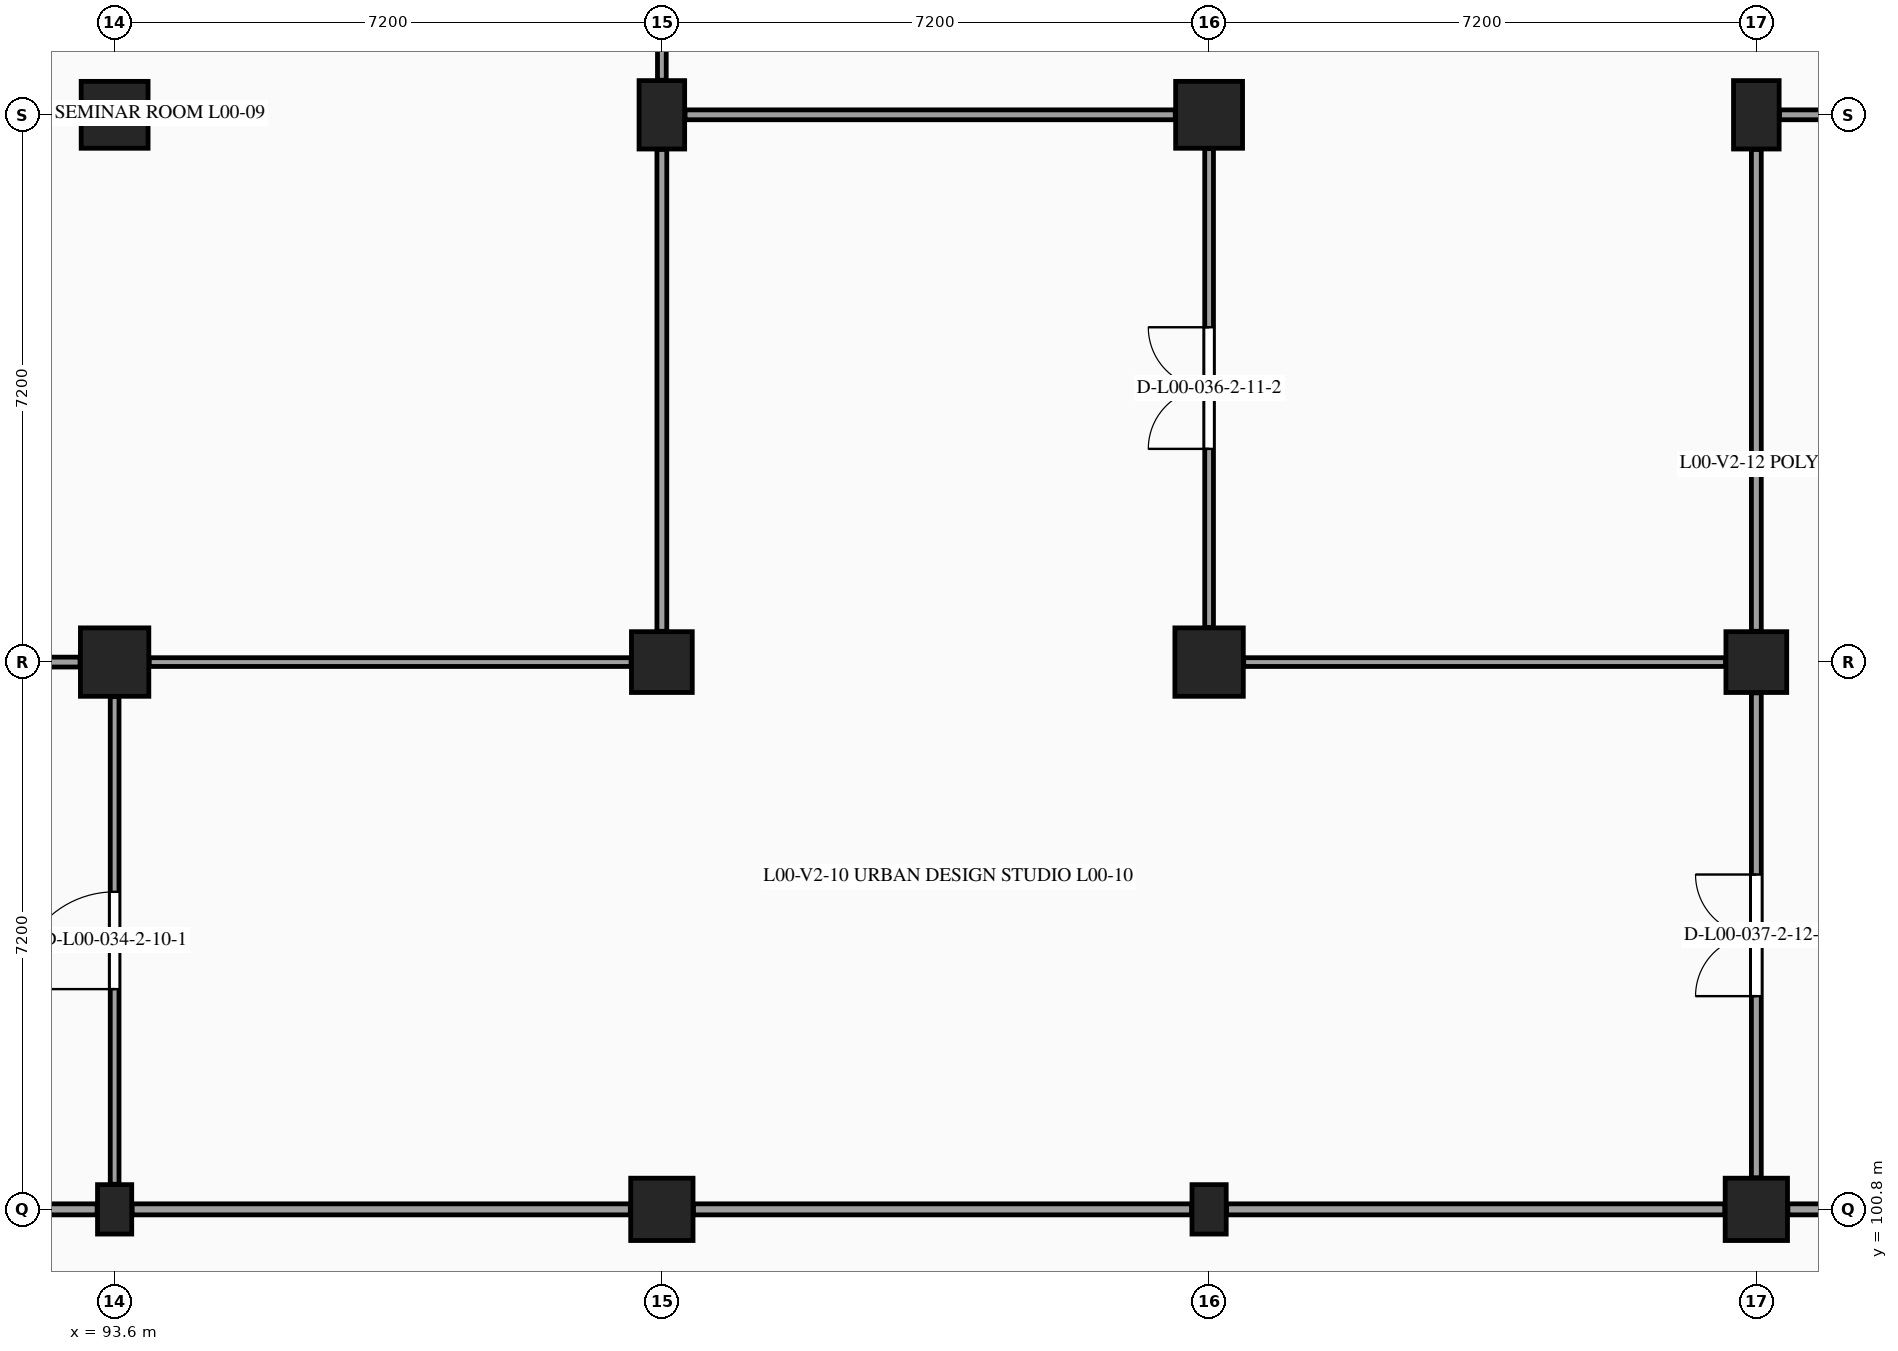
"""IFC4 building model, lengths in metres.
Left out: names, types, materials, properties, quantities, classifications, styles, units other than length and angle.
Written with IfcOpenShell. Run it as: python <this file> out.ifc"""

import sys

from ifc_helpers import new_model, si_unit, direction, frame, frame_2d, origin, origin_2d, place, context, subcontext, project, spatial, rectangle, extrude, element, fill, save


model = new_model("IFC4")
c1 = context("Model", 3, precision=1e-05, world=origin(), true_north=direction((0.0, 1.0)))
c2 = subcontext(c1, "Body", "Model", "MODEL_VIEW")
j1 = project(units=[si_unit("LENGTHUNIT", "METRE"), si_unit("PLANEANGLEUNIT", "RADIAN")], contexts=[c1])
p1 = place(None, origin())
s1 = spatial("IfcSite", under=j1, at=p1, CompositionType="ELEMENT")
p2 = place(p1, origin())
s2 = spatial("IfcBuilding", under=s1, at=p2, CompositionType="ELEMENT")
p3 = place(p2, origin())
s3 = spatial("IfcBuildingStorey", under=s2, at=p3, CompositionType="ELEMENT", Elevation=0.0)
p4 = place(p3, frame((93.6, 100.8, 0.0), z_axis=(0.0, 0.0, 1.0), x_axis=(1.0, 0.0, 0.0)))
e1 = element("IfcColumn", 1, at=p4, inside=s3, PredefinedType="PILASTER", context=c2, shape_type="SweptSolid", body=[
    extrude(rectangle(XDim=0.45, YDim=0.65, at=origin_2d()), origin(), (0.0, 0.0, 1.0), 5.4),
])
p5 = place(p3, frame((93.6, 108.0, 0.0), z_axis=(0.0, 0.0, 1.0), x_axis=(1.0, 0.0, 0.0)))
e2 = element("IfcColumn", 2, at=p5, inside=s3, PredefinedType="COLUMN", context=c2, shape_type="SweptSolid", body=[
    extrude(rectangle(XDim=0.9, YDim=0.9, at=origin_2d()), origin(), (0.0, 0.0, 1.0), 5.4),
])
p6 = place(p3, frame((93.6, 115.2, 0.0), z_axis=(0.0, 0.0, 1.0), x_axis=(1.0, 0.0, 0.0)))
e3 = element("IfcColumn", 3, at=p6, inside=s3, PredefinedType="COLUMN", context=c2, shape_type="SweptSolid", body=[
    extrude(rectangle(XDim=0.88, YDim=0.88, at=origin_2d()), origin(), (0.0, 0.0, 1.0), 5.4),
])
p7 = place(p3, frame((100.8, 100.8, 0.0), z_axis=(0.0, 0.0, 1.0), x_axis=(1.0, 0.0, 0.0)))
e4 = element("IfcColumn", 4, at=p7, inside=s3, PredefinedType="COLUMN", context=c2, shape_type="SweptSolid", body=[
    extrude(rectangle(XDim=0.82, YDim=0.82, at=origin_2d()), origin(), (0.0, 0.0, 1.0), 5.4),
])
p8 = place(p3, frame((100.8, 108.0, 0.0), z_axis=(0.0, 0.0, 1.0), x_axis=(1.0, 0.0, 0.0)))
e5 = element("IfcColumn", 5, at=p8, inside=s3, PredefinedType="COLUMN", context=c2, shape_type="SweptSolid", body=[
    extrude(rectangle(XDim=0.8, YDim=0.8, at=origin_2d()), origin(), (0.0, 0.0, 1.0), 5.4),
])
p9 = place(p3, frame((100.8, 115.2, 0.0), z_axis=(0.0, 0.0, 1.0), x_axis=(1.0, 0.0, 0.0)))
e6 = element("IfcColumn", 6, at=p9, inside=s3, PredefinedType="COLUMN", context=c2, shape_type="SweptSolid", body=[
    extrude(rectangle(XDim=0.6, YDim=0.9, at=origin_2d()), origin(), (0.0, 0.0, 1.0), 5.4),
])
p10 = place(p3, frame((108.0, 100.8, 0.0), z_axis=(0.0, 0.0, 1.0), x_axis=(1.0, 0.0, 0.0)))
e7 = element("IfcColumn", 7, at=p10, inside=s3, PredefinedType="PILASTER", context=c2, shape_type="SweptSolid", body=[
    extrude(rectangle(XDim=0.45, YDim=0.65, at=origin_2d()), origin(), (0.0, 0.0, 1.0), 5.4),
])
p11 = place(p3, frame((108.0, 108.0, 0.0), z_axis=(0.0, 0.0, 1.0), x_axis=(1.0, 0.0, 0.0)))
e8 = element("IfcColumn", 8, at=p11, inside=s3, PredefinedType="COLUMN", context=c2, shape_type="SweptSolid", body=[
    extrude(rectangle(XDim=0.9, YDim=0.9, at=origin_2d()), origin(), (0.0, 0.0, 1.0), 5.4),
])
p12 = place(p3, frame((108.0, 115.2, 0.0), z_axis=(0.0, 0.0, 1.0), x_axis=(1.0, 0.0, 0.0)))
e9 = element("IfcColumn", 9, at=p12, inside=s3, PredefinedType="COLUMN", context=c2, shape_type="SweptSolid", body=[
    extrude(rectangle(XDim=0.88, YDim=0.88, at=origin_2d()), origin(), (0.0, 0.0, 1.0), 5.4),
])
p13 = place(p3, frame((115.2, 100.8, 0.0), z_axis=(0.0, 0.0, 1.0), x_axis=(1.0, 0.0, 0.0)))
e10 = element("IfcColumn", 10, at=p13, inside=s3, PredefinedType="COLUMN", context=c2, shape_type="SweptSolid", body=[
    extrude(rectangle(XDim=0.82, YDim=0.82, at=origin_2d()), origin(), (0.0, 0.0, 1.0), 5.4),
])
p14 = place(p3, frame((115.2, 108.0, 0.0), z_axis=(0.0, 0.0, 1.0), x_axis=(1.0, 0.0, 0.0)))
e11 = element("IfcColumn", 11, at=p14, inside=s3, PredefinedType="COLUMN", context=c2, shape_type="SweptSolid", body=[
    extrude(rectangle(XDim=0.8, YDim=0.8, at=origin_2d()), origin(), (0.0, 0.0, 1.0), 5.4),
])
p15 = place(p3, frame((115.2, 115.2, 0.0), z_axis=(0.0, 0.0, 1.0), x_axis=(1.0, 0.0, 0.0)))
e12 = element("IfcColumn", 12, at=p15, inside=s3, PredefinedType="COLUMN", context=c2, shape_type="SweptSolid", body=[
    extrude(rectangle(XDim=0.6, YDim=0.9, at=origin_2d()), origin(), (0.0, 0.0, 1.0), 5.4),
])
p16 = place(p3, frame((86.815, 100.8, 0.0), z_axis=(0.0, 0.0, 1.0), x_axis=(1.0, 0.0, 0.0)))
e13 = element("IfcWall", 13, at=p16, inside=s3, PredefinedType="PARTITIONING", context=c2, shape_type="SweptSolid", body=[
    extrude(rectangle(XDim=6.555, YDim=0.145, at=frame_2d((3.278, 0.0))), origin(), (0.0, 0.0, 1.0), 4.35),
])
p17 = place(p3, frame((93.6, 101.13, 0.0), z_axis=(0.0, 0.0, 1.0), x_axis=(0.0, 1.0, 0.0)))
e14 = element("IfcWall", 14, at=p17, inside=s3, PredefinedType="PARTITIONING", context=c2, shape_type="SweptSolid", body=[
    extrude(rectangle(XDim=6.415, YDim=0.115, at=frame_2d((3.208, 0.0))), origin(), (0.0, 0.0, 1.0), 4.455),
])
p18 = place(p17, frame((2.567, 0.0, 0.0)))
e15 = element("IfcOpeningElement", 15, at=p18, cuts=e14, PredefinedType="OPENING", context=c2, shape_type="SweptSolid", body=[
    extrude(rectangle(XDim=1.28, YDim=2.24, at=frame_2d((0.64, 1.12))), frame((0.0, 0.067, 0.0), z_axis=(0.0, -1.0, 0.0), x_axis=(1.0, 0.0, 0.0)), (0.0, 0.0, 1.0), 0.135),
])
p19 = place(p3, frame((86.805, 108.0, 0.0), z_axis=(0.0, 0.0, 1.0), x_axis=(1.0, 0.0, 0.0)))
e16 = element("IfcWall", 16, at=p19, inside=s3, PredefinedType="PARTITIONING", context=c2, shape_type="SweptSolid", body=[
    extrude(rectangle(XDim=6.34, YDim=0.13, at=frame_2d((3.17, 0.0))), origin(), (0.0, 0.0, 1.0), 4.35),
])
p20 = place(p3, frame((93.83, 100.8, 0.0), z_axis=(0.0, 0.0, 1.0), x_axis=(1.0, 0.0, 0.0)))
e17 = element("IfcWall", 17, at=p20, inside=s3, PredefinedType="PARTITIONING", context=c2, shape_type="SweptSolid", body=[
    extrude(rectangle(XDim=6.555, YDim=0.145, at=frame_2d((3.277, 0.0))), origin(), (0.0, 0.0, 1.0), 4.365),
])
p21 = place(p3, frame((94.055, 108.0, 0.0), z_axis=(0.0, 0.0, 1.0), x_axis=(1.0, 0.0, 0.0)))
e18 = element("IfcWall", 18, at=p21, inside=s3, PredefinedType="PARTITIONING", context=c2, shape_type="SweptSolid", body=[
    extrude(rectangle(XDim=6.34, YDim=0.115, at=frame_2d((3.17, 0.0))), origin(), (0.0, 0.0, 1.0), 4.365),
])
p22 = place(p3, frame((100.8, 108.405, 0.0), z_axis=(0.0, 0.0, 1.0), x_axis=(0.0, 1.0, 0.0)))
e19 = element("IfcWall", 19, at=p22, inside=s3, PredefinedType="PARTITIONING", context=c2, shape_type="SweptSolid", body=[
    extrude(rectangle(XDim=6.34, YDim=0.13, at=frame_2d((3.17, 0.0))), origin(), (0.0, 0.0, 1.0), 4.405),
])
p23 = place(p3, frame((100.8, 115.655, 0.0), z_axis=(0.0, 0.0, 1.0), x_axis=(0.0, 1.0, 0.0)))
e20 = element("IfcWall", 20, at=p23, inside=s3, PredefinedType="PARTITIONING", context=c2, shape_type="SweptSolid", body=[
    extrude(rectangle(XDim=6.415, YDim=0.115, at=frame_2d((3.208, 0.0))), origin(), (0.0, 0.0, 1.0), 4.405),
])
p24 = place(p23, frame((2.407, 0.0, 0.0)))
e21 = element("IfcOpeningElement", 21, at=p24, cuts=e20, PredefinedType="OPENING", context=c2, shape_type="SweptSolid", body=[
    extrude(rectangle(XDim=1.6, YDim=2.2, at=frame_2d((0.8, 1.1))), frame((0.0, 0.067, 0.0), z_axis=(0.0, -1.0, 0.0), x_axis=(1.0, 0.0, 0.0)), (0.0, 0.0, 1.0), 0.135),
])
p25 = place(p3, frame((101.215, 100.8, 0.0), z_axis=(0.0, 0.0, 1.0), x_axis=(1.0, 0.0, 0.0)))
e22 = element("IfcWall", 22, at=p25, inside=s3, PredefinedType="PARTITIONING", context=c2, shape_type="SweptSolid", body=[
    extrude(rectangle(XDim=6.555, YDim=0.145, at=frame_2d((3.277, 0.0))), origin(), (0.0, 0.0, 1.0), 4.37),
])
p26 = place(p3, frame((108.0, 108.455, 0.0), z_axis=(0.0, 0.0, 1.0), x_axis=(0.0, 1.0, 0.0)))
e23 = element("IfcWall", 23, at=p26, inside=s3, PredefinedType="PARTITIONING", context=c2, shape_type="SweptSolid", body=[
    extrude(rectangle(XDim=6.3, YDim=0.115, at=frame_2d((3.15, 0.0))), origin(), (0.0, 0.0, 1.0), 4.405),
])
p27 = place(p26, frame((2.35, 0.0, 0.0)))
e24 = element("IfcOpeningElement", 24, at=p27, cuts=e23, PredefinedType="OPENING", context=c2, shape_type="SweptSolid", body=[
    extrude(rectangle(XDim=1.6, YDim=2.2, at=frame_2d((0.8, 1.1))), frame((0.0, 0.067, 0.0), z_axis=(0.0, -1.0, 0.0), x_axis=(1.0, 0.0, 0.0)), (0.0, 0.0, 1.0), 0.135),
])
p28 = place(p3, frame((101.105, 115.2, 0.0), z_axis=(0.0, 0.0, 1.0), x_axis=(1.0, 0.0, 0.0)))
e25 = element("IfcWall", 25, at=p28, inside=s3, PredefinedType="PARTITIONING", context=c2, shape_type="SweptSolid", body=[
    extrude(rectangle(XDim=6.45, YDim=0.13, at=frame_2d((3.225, 0.0))), origin(), (0.0, 0.0, 1.0), 4.37),
])
p29 = place(p3, frame((108.23, 100.8, 0.0), z_axis=(0.0, 0.0, 1.0), x_axis=(1.0, 0.0, 0.0)))
e26 = element("IfcWall", 26, at=p29, inside=s3, PredefinedType="PARTITIONING", context=c2, shape_type="SweptSolid", body=[
    extrude(rectangle(XDim=6.555, YDim=0.145, at=frame_2d((3.277, 0.0))), origin(), (0.0, 0.0, 1.0), 4.39),
])
p30 = place(p3, frame((115.2, 101.215, 0.0), z_axis=(0.0, 0.0, 1.0), x_axis=(0.0, 1.0, 0.0)))
e27 = element("IfcWall", 27, at=p30, inside=s3, PredefinedType="PARTITIONING", context=c2, shape_type="SweptSolid", body=[
    extrude(rectangle(XDim=6.38, YDim=0.13, at=frame_2d((3.19, 0.0))), origin(), (0.0, 0.0, 1.0), 4.455),
])
p31 = place(p30, frame((2.39, 0.0, 0.0)))
e28 = element("IfcOpeningElement", 28, at=p31, cuts=e27, PredefinedType="OPENING", context=c2, shape_type="SweptSolid", body=[
    extrude(rectangle(XDim=1.6, YDim=2.2, at=frame_2d((0.8, 1.1))), frame((0.0, 0.075, 0.0), z_axis=(0.0, -1.0, 0.0), x_axis=(1.0, 0.0, 0.0)), (0.0, 0.0, 1.0), 0.15),
])
p32 = place(p3, frame((108.455, 108.0, 0.0), z_axis=(0.0, 0.0, 1.0), x_axis=(1.0, 0.0, 0.0)))
e29 = element("IfcWall", 29, at=p32, inside=s3, PredefinedType="PARTITIONING", context=c2, shape_type="SweptSolid", body=[
    extrude(rectangle(XDim=6.34, YDim=0.115, at=frame_2d((3.17, 0.0))), origin(), (0.0, 0.0, 1.0), 4.39),
])
p33 = place(p3, frame((115.2, 108.405, 0.0), z_axis=(0.0, 0.0, 1.0), x_axis=(0.0, 1.0, 0.0)))
e30 = element("IfcWall", 30, at=p33, inside=s3, PredefinedType="PARTITIONING", context=c2, shape_type="SweptSolid", body=[
    extrude(rectangle(XDim=6.34, YDim=0.13, at=frame_2d((3.17, 0.0))), origin(), (0.0, 0.0, 1.0), 4.405),
])
p34 = place(p3, frame((115.615, 100.8, 0.0), z_axis=(0.0, 0.0, 1.0), x_axis=(1.0, 0.0, 0.0)))
e31 = element("IfcWall", 31, at=p34, inside=s3, PredefinedType="PARTITIONING", context=c2, shape_type="SweptSolid", body=[
    extrude(rectangle(XDim=6.555, YDim=0.145, at=frame_2d((3.277, 0.0))), origin(), (0.0, 0.0, 1.0), 4.43),
])
p35 = place(p3, frame((115.505, 115.2, 0.0), z_axis=(0.0, 0.0, 1.0), x_axis=(1.0, 0.0, 0.0)))
e32 = element("IfcWall", 32, at=p35, inside=s3, PredefinedType="PARTITIONING", context=c2, shape_type="SweptSolid", body=[
    extrude(rectangle(XDim=6.45, YDim=0.13, at=frame_2d((3.225, 0.0))), origin(), (0.0, 0.0, 1.0), 4.43),
])
p36 = place(p18, origin())
e33 = element("IfcDoor", 33, at=p36, inside=s3, OperationType="SINGLE_SWING_LEFT", PredefinedType="DOOR", context=c2, shape_type="SweptSolid", body=[
    extrude(rectangle(XDim=1.28, YDim=2.24, at=frame_2d((0.64, 1.12))), frame((0.0, 0.025, 0.0), z_axis=(0.0, -1.0, 0.0), x_axis=(1.0, 0.0, 0.0)), (0.0, 0.0, 1.0), 0.05),
])
fill(e15, e33)
p37 = place(p27, origin())
e34 = element("IfcDoor", 34, at=p37, inside=s3, OperationType="DOUBLE_DOOR_SINGLE_SWING", PredefinedType="DOOR", context=c2, shape_type="SweptSolid", body=[
    extrude(rectangle(XDim=1.6, YDim=2.2, at=frame_2d((0.8, 1.1))), frame((0.0, 0.025, 0.0), z_axis=(0.0, -1.0, 0.0), x_axis=(1.0, 0.0, 0.0)), (0.0, 0.0, 1.0), 0.05),
])
fill(e24, e34)
p38 = place(p31, origin())
e35 = element("IfcDoor", 35, at=p38, inside=s3, OperationType="DOUBLE_DOOR_SINGLE_SWING", PredefinedType="DOOR", context=c2, shape_type="SweptSolid", body=[
    extrude(rectangle(XDim=1.6, YDim=2.2, at=frame_2d((0.8, 1.1))), frame((0.0, 0.025, 0.0), z_axis=(0.0, -1.0, 0.0), x_axis=(1.0, 0.0, 0.0)), (0.0, 0.0, 1.0), 0.05),
])
fill(e28, e35)
save(model, sys.argv[1])
